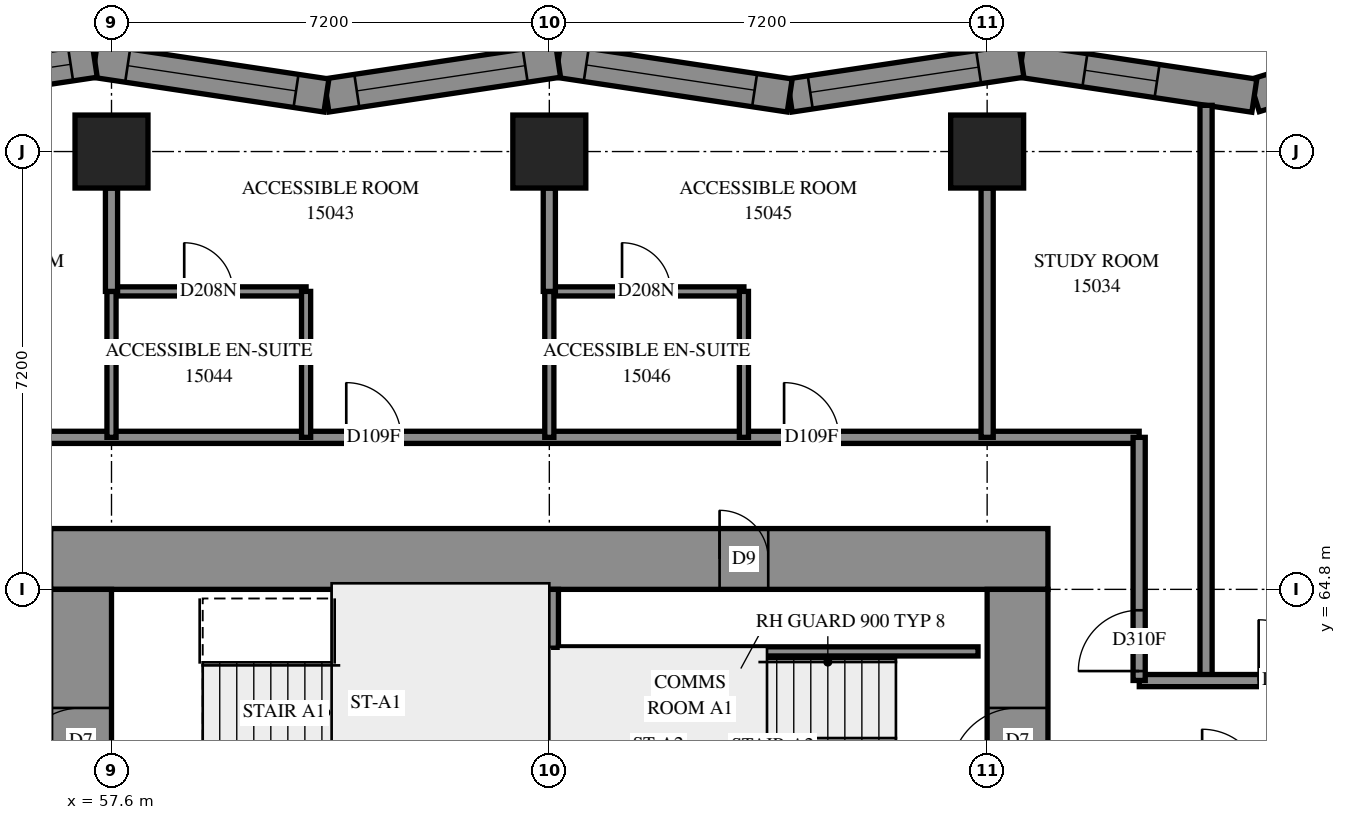
"""IFC4 building model, lengths in metres.
Left out: names, types, materials, properties, quantities, classifications, styles, units other than length and angle.
Written with IfcOpenShell. Run it as: python <this file> out.ifc"""

import sys

from ifc_helpers import new_model, si_unit, direction, frame, frame_2d, origin, origin_2d, place, context, subcontext, project, spatial, polyline, rectangle, outline, extrude, element, fill, save


model = new_model("IFC4")
c1 = context("Model", 3, precision=1e-05, world=origin(), true_north=direction((0.0, 1.0)))
c2 = subcontext(c1, "Body", "Model", "MODEL_VIEW")
j1 = project(units=[si_unit("LENGTHUNIT", "METRE"), si_unit("PLANEANGLEUNIT", "RADIAN")], contexts=[c1])
p1 = place(None, origin())
s1 = spatial("IfcSite", under=j1, at=p1, CompositionType="ELEMENT")
p2 = place(p1, origin())
s2 = spatial("IfcBuilding", under=s1, at=p2, CompositionType="ELEMENT")
p3 = place(p2, frame((0.0, 0.0, 57.6)))
s3 = spatial("IfcBuildingStorey", under=s2, at=p3, CompositionType="ELEMENT", Elevation=57.6)
for number, where, z_axis, x_axis in (
    (1, (57.6, 72.0, 0.0), (0.0, 0.0, 1.0), (1.0, 0.0, 0.0)),
    (2, (64.8, 72.0, 0.0), (0.0, 0.0, 1.0), (1.0, 0.0, 0.0)),
    (3, (72.0, 72.0, 0.0), (0.0, 0.0, 1.0), (1.0, 0.0, 0.0)),
):
    element("IfcColumn", number, at=place(p3, frame(where, z_axis=z_axis, x_axis=x_axis)), inside=s3, PredefinedType="COLUMN", context=c2, shape_type="SweptSolid", body=[
        extrude(rectangle(XDim=1.2, YDim=1.2, at=origin_2d()), origin(), (0.0, 0.0, 1.0), 3.1),
    ])
p4 = place(p3, frame((56.6, 65.3, -0.3), z_axis=(0.0, 0.0, 1.0), x_axis=(1.0, 0.0, 0.0)))
e4 = element("IfcWall", 4, at=p4, inside=s3, PredefinedType="SHEAR", context=c2, shape_type="SweptSolid", body=[
    extrude(rectangle(XDim=16.4, YDim=1.0, at=frame_2d((8.2, 0.0))), origin(), (0.0, 0.0, 1.0), 2.7),
])
p5 = place(p4, frame((11.0, 0.0, 0.3)))
e5 = element("IfcOpeningElement", 5, at=p5, cuts=e4, PredefinedType="OPENING", context=c2, shape_type="SweptSolid", body=[
    extrude(rectangle(XDim=0.8, YDim=2.1, at=frame_2d((0.4, 1.05))), frame((0.0, 0.51, 0.0), z_axis=(0.0, -1.0, 0.0), x_axis=(1.0, 0.0, 0.0)), (0.0, 0.0, 1.0), 1.02),
])
p6 = place(p3, frame((57.1, 50.4, -0.3), z_axis=(0.0, 0.0, 1.0), x_axis=(0.0, 1.0, 0.0)))
e6 = element("IfcWall", 6, at=p6, inside=s3, PredefinedType="SHEAR", context=c2, shape_type="SweptSolid", body=[
    extrude(rectangle(XDim=14.4, YDim=1.0, at=frame_2d((7.2, 0.0))), origin(), (0.0, 0.0, 1.0), 2.7),
])
p7 = place(p6, frame((4.55, 0.0, 0.3)))
e7 = element("IfcOpeningElement", 7, at=p7, cuts=e6, PredefinedType="OPENING", context=c2, shape_type="SweptSolid", body=[
    extrude(rectangle(XDim=1.1, YDim=2.1, at=frame_2d((0.55, 1.05))), frame((0.0, 0.51, 0.0), z_axis=(0.0, -1.0, 0.0), x_axis=(1.0, 0.0, 0.0)), (0.0, 0.0, 1.0), 1.02),
])
p8 = place(p6, frame((11.35, 0.0, 0.3)))
e8 = element("IfcOpeningElement", 8, at=p8, cuts=e6, PredefinedType="OPENING", context=c2, shape_type="SweptSolid", body=[
    extrude(rectangle(XDim=1.1, YDim=2.1, at=frame_2d((0.55, 1.05))), frame((0.0, 0.51, 0.0), z_axis=(0.0, -1.0, 0.0), x_axis=(1.0, 0.0, 0.0)), (0.0, 0.0, 1.0), 1.02),
])
p9 = place(p3, frame((72.5, 50.4, -0.3), z_axis=(0.0, 0.0, 1.0), x_axis=(0.0, 1.0, 0.0)))
e9 = element("IfcWall", 9, at=p9, inside=s3, PredefinedType="SHEAR", context=c2, shape_type="SweptSolid", body=[
    extrude(rectangle(XDim=14.4, YDim=1.0, at=frame_2d((7.2, 0.0))), origin(), (0.0, 0.0, 1.0), 2.7),
])
p10 = place(p9, frame((4.55, 0.0, 0.3)))
e10 = element("IfcOpeningElement", 10, at=p10, cuts=e9, PredefinedType="OPENING", context=c2, shape_type="SweptSolid", body=[
    extrude(rectangle(XDim=1.1, YDim=2.1, at=frame_2d((0.55, 1.05))), frame((0.0, 0.51, 0.0), z_axis=(0.0, -1.0, 0.0), x_axis=(1.0, 0.0, 0.0)), (0.0, 0.0, 1.0), 1.02),
])
p11 = place(p9, frame((11.35, 0.0, 0.3)))
e11 = element("IfcOpeningElement", 11, at=p11, cuts=e9, PredefinedType="OPENING", context=c2, shape_type="SweptSolid", body=[
    extrude(rectangle(XDim=1.1, YDim=2.1, at=frame_2d((0.55, 1.05))), frame((0.0, 0.51, 0.0), z_axis=(0.0, -1.0, 0.0), x_axis=(1.0, 0.0, 0.0)), (0.0, 0.0, 1.0), 1.02),
])
p12 = place(p3, frame((64.8, 60.6, 0.0), z_axis=(0.0, 0.0, 1.0), x_axis=(0.0, 1.0, 0.0)))
e12 = element("IfcWall", 12, at=p12, inside=s3, PredefinedType="SOLIDWALL", context=c2, shape_type="SweptSolid", body=[
    extrude(rectangle(XDim=4.2, YDim=0.3, at=frame_2d((2.1, 0.0))), origin(), (0.0, 0.0, 1.0), 3.1),
])
p13 = place(p3, frame((80.039, 74.04, 0.0), z_axis=(0.0, 0.0, 1.0), x_axis=(-0.9557960147, -0.2940305738, 0.0)))
e13 = element("IfcWall", 13, at=p13, inside=s3, PredefinedType="SOLIDWALL", context=c2, shape_type="SweptSolid", body=[
    extrude(outline(polyline([(-0.235, -0.275), (3.751, -0.275), (3.876, 0.275), (0.235, 0.275), (-0.235, -0.275)])), origin(), (0.0, 0.0, 1.0), 3.1),
])
p14 = place(p13, frame((1.646, 0.0, 0.5)))
e14 = element("IfcOpeningElement", 14, at=p14, cuts=e13, PredefinedType="OPENING", context=c2, shape_type="SweptSolid", body=[
    extrude(rectangle(XDim=1.2, YDim=2.45, at=frame_2d((0.6, 1.225))), frame((0.0, 0.285, 0.0), z_axis=(0.0, -1.0, 0.0), x_axis=(1.0, 0.0, 0.0)), (0.0, 0.0, 1.0), 0.57),
])
p15 = place(p3, frame((76.394, 72.919, 0.0), z_axis=(0.0, 0.0, 1.0), x_axis=(-0.9889175987, 0.1484654269, 0.0)))
e15 = element("IfcWall", 15, at=p15, inside=s3, PredefinedType="SOLIDWALL", context=c2, shape_type="SweptSolid", body=[
    extrude(outline(polyline([(0.063, -0.275), (3.915, -0.275), (3.832, 0.275), (-0.063, 0.275), (0.063, -0.275)])), origin(), (0.0, 0.0, 1.0), 3.1),
])
p16 = place(p15, frame((1.618, 0.0, 0.5)))
e16 = element("IfcOpeningElement", 16, at=p16, cuts=e15, PredefinedType="OPENING", context=c2, shape_type="SweptSolid", body=[
    extrude(rectangle(XDim=1.2, YDim=2.45, at=frame_2d((0.6, 1.225))), frame((0.0, 0.285, 0.0), z_axis=(0.0, -1.0, 0.0), x_axis=(1.0, 0.0, 0.0)), (0.0, 0.0, 1.0), 0.57),
])
p17 = place(p3, frame((72.563, 73.494, 0.0), z_axis=(0.0, 0.0, 1.0), x_axis=(-0.9889150173, -0.1484826202, 0.0)))
e17 = element("IfcWall", 17, at=p17, inside=s3, PredefinedType="SOLIDWALL", context=c2, shape_type="SweptSolid", body=[
    extrude(outline(polyline([(-0.041, -0.275), (3.811, -0.275), (3.894, 0.275), (0.041, 0.275), (-0.041, -0.275)])), origin(), (0.0, 0.0, 1.0), 3.1),
])
p18 = place(p17, frame((0.711, 0.0, 0.5)))
e18 = element("IfcOpeningElement", 18, at=p18, cuts=e17, PredefinedType="OPENING", context=c2, shape_type="SweptSolid", body=[
    extrude(rectangle(XDim=2.8, YDim=2.45, at=frame_2d((1.4, 1.225))), frame((0.0, 0.285, 0.0), z_axis=(0.0, -1.0, 0.0), x_axis=(1.0, 0.0, 0.0)), (0.0, 0.0, 1.0), 0.57),
])
p19 = place(p3, frame((68.754, 72.922, 0.0), z_axis=(0.0, 0.0, 1.0), x_axis=(-0.9889155896, 0.1484788086, 0.0)))
e19 = element("IfcWall", 19, at=p19, inside=s3, PredefinedType="SOLIDWALL", context=c2, shape_type="SweptSolid", body=[
    extrude(outline(polyline([(0.041, -0.275), (3.894, -0.275), (3.811, 0.275), (-0.041, 0.275), (0.041, -0.275)])), origin(), (0.0, 0.0, 1.0), 3.1),
])
p20 = place(p19, frame((0.584, 0.0, 0.5)))
e20 = element("IfcOpeningElement", 20, at=p20, cuts=e19, PredefinedType="OPENING", context=c2, shape_type="SweptSolid", body=[
    extrude(rectangle(XDim=2.8, YDim=2.45, at=frame_2d((1.4, 1.225))), frame((0.0, 0.285, 0.0), z_axis=(0.0, -1.0, 0.0), x_axis=(1.0, 0.0, 0.0)), (0.0, 0.0, 1.0), 0.57),
])
p21 = place(p3, frame((64.944, 73.494, 0.0), z_axis=(0.0, 0.0, 1.0), x_axis=(-0.9889150173, -0.1484826202, 0.0)))
e21 = element("IfcWall", 21, at=p21, inside=s3, PredefinedType="SOLIDWALL", context=c2, shape_type="SweptSolid", body=[
    extrude(outline(polyline([(-0.041, -0.275), (3.811, -0.275), (3.894, 0.275), (0.041, 0.275), (-0.041, -0.275)])), origin(), (0.0, 0.0, 1.0), 3.1),
])
p22 = place(p21, frame((0.547, 0.0, 0.5)))
e22 = element("IfcOpeningElement", 22, at=p22, cuts=e21, PredefinedType="OPENING", context=c2, shape_type="SweptSolid", body=[
    extrude(rectangle(XDim=2.8, YDim=2.45, at=frame_2d((1.4, 1.225))), frame((0.0, 0.285, 0.0), z_axis=(0.0, -1.0, 0.0), x_axis=(1.0, 0.0, 0.0)), (0.0, 0.0, 1.0), 0.57),
])
p23 = place(p3, frame((61.134, 72.922, 0.0), z_axis=(0.0, 0.0, 1.0), x_axis=(-0.9889155896, 0.1484788086, 0.0)))
e23 = element("IfcWall", 23, at=p23, inside=s3, PredefinedType="SOLIDWALL", context=c2, shape_type="SweptSolid", body=[
    extrude(outline(polyline([(0.041, -0.275), (3.894, -0.275), (3.811, 0.275), (-0.041, 0.275), (0.041, -0.275)])), origin(), (0.0, 0.0, 1.0), 3.1),
])
p24 = place(p23, frame((0.505, 0.0, 0.5)))
e24 = element("IfcOpeningElement", 24, at=p24, cuts=e23, PredefinedType="OPENING", context=c2, shape_type="SweptSolid", body=[
    extrude(rectangle(XDim=2.8, YDim=2.45, at=frame_2d((1.4, 1.225))), frame((0.0, 0.285, 0.0), z_axis=(0.0, -1.0, 0.0), x_axis=(1.0, 0.0, 0.0)), (0.0, 0.0, 1.0), 0.57),
])
p25 = place(p3, frame((57.325, 73.494, 0.0), z_axis=(0.0, 0.0, 1.0), x_axis=(-0.9889155896, -0.1484788086, 0.0)))
e25 = element("IfcWall", 25, at=p25, inside=s3, PredefinedType="SOLIDWALL", context=c2, shape_type="SweptSolid", body=[
    extrude(outline(polyline([(-0.041, -0.275), (3.811, -0.275), (3.894, 0.275), (0.041, 0.275), (-0.041, -0.275)])), origin(), (0.0, 0.0, 1.0), 3.1),
])
p26 = place(p25, frame((0.402, 0.0, 0.5)))
e26 = element("IfcOpeningElement", 26, at=p26, cuts=e25, PredefinedType="OPENING", context=c2, shape_type="SweptSolid", body=[
    extrude(rectangle(XDim=2.8, YDim=2.45, at=frame_2d((1.4, 1.225))), frame((0.0, 0.285, 0.0), z_axis=(0.0, -1.0, 0.0), x_axis=(1.0, 0.0, 0.0)), (0.0, 0.0, 1.0), 0.57),
])
p27 = place(p3, frame((64.95, 63.78, 0.0), z_axis=(0.0, 0.0, 1.0), x_axis=(1.0, 0.0, 0.0)))
e27 = element("IfcWall", 27, at=p27, inside=s3, PredefinedType="PARTITIONING", context=c2, shape_type="SweptSolid", body=[
    extrude(rectangle(XDim=6.9, YDim=0.15, at=frame_2d((3.45, 0.0))), origin(), (0.0, 0.0, 1.0), 3.1),
])
p28 = place(p3, frame((55.1, 67.3, 0.0), z_axis=(0.0, 0.0, 1.0), x_axis=(1.0, 0.0, 0.0)))
e28 = element("IfcWall", 28, at=p28, inside=s3, PredefinedType="PARTITIONING", context=c2, shape_type="SweptSolid", body=[
    extrude(rectangle(XDim=19.4, YDim=0.2, at=frame_2d((9.7, 0.0))), origin(), (0.0, 0.0, 1.0), 3.1),
])
p29 = place(p28, frame((6.361, 0.0, 0.0)))
e29 = element("IfcOpeningElement", 29, at=p29, cuts=e28, PredefinedType="OPENING", context=c2, shape_type="SweptSolid", body=[
    extrude(rectangle(XDim=0.9, YDim=2.1, at=frame_2d((0.45, 1.05))), frame((0.0, 0.11, 0.0), z_axis=(0.0, -1.0, 0.0), x_axis=(1.0, 0.0, 0.0)), (0.0, 0.0, 1.0), 0.22),
])
p30 = place(p28, frame((13.561, 0.0, 0.0)))
e30 = element("IfcOpeningElement", 30, at=p30, cuts=e28, PredefinedType="OPENING", context=c2, shape_type="SweptSolid", body=[
    extrude(rectangle(XDim=0.9, YDim=2.1, at=frame_2d((0.45, 1.05))), frame((0.0, 0.11, 0.0), z_axis=(0.0, -1.0, 0.0), x_axis=(1.0, 0.0, 0.0)), (0.0, 0.0, 1.0), 0.22),
])
p31 = place(p3, frame((75.6, 63.3, 0.0), z_axis=(0.0, 0.0, 1.0), x_axis=(0.0, 1.0, 0.0)))
e31 = element("IfcWall", 31, at=p31, inside=s3, PredefinedType="PARTITIONING", context=c2, shape_type="SweptSolid", body=[
    extrude(rectangle(XDim=9.46, YDim=0.2, at=frame_2d((4.73, 0.0))), origin(), (0.0, 0.0, 1.0), 3.1),
])
p32 = place(p3, frame((74.502, 63.3, 0.0), z_axis=(0.0, 0.0, 1.0), x_axis=(1.0, 0.0, 0.0)))
e32 = element("IfcWall", 32, at=p32, inside=s3, PredefinedType="PARTITIONING", context=c2, shape_type="SweptSolid", body=[
    extrude(rectangle(XDim=4.698, YDim=0.2, at=frame_2d((2.349, 0.0))), origin(), (0.0, 0.0, 1.0), 3.1),
])
p33 = place(p32, frame((1.963, 0.0, 0.0)))
e33 = element("IfcOpeningElement", 33, at=p33, cuts=e32, PredefinedType="OPENING", context=c2, shape_type="SweptSolid", body=[
    extrude(rectangle(XDim=1.0, YDim=2.1, at=frame_2d((0.5, 1.05))), frame((0.0, 0.11, 0.0), z_axis=(0.0, -1.0, 0.0), x_axis=(1.0, 0.0, 0.0)), (0.0, 0.0, 1.0), 0.22),
])
p34 = place(p3, frame((72.0, 67.3, 0.0), z_axis=(0.0, 0.0, 1.0), x_axis=(0.0, 1.0, 0.0)))
e34 = element("IfcWall", 34, at=p34, inside=s3, PredefinedType="PARTITIONING", context=c2, shape_type="SweptSolid", body=[
    extrude(rectangle(XDim=4.1, YDim=0.2, at=frame_2d((2.05, 0.0))), origin(), (0.0, 0.0, 1.0), 3.1),
])
p35 = place(p3, frame((74.5, 63.302, 0.0), z_axis=(0.0, 0.0, 1.0), x_axis=(0.0, 1.0, 0.0)))
e35 = element("IfcWall", 35, at=p35, inside=s3, PredefinedType="PARTITIONING", context=c2, shape_type="SweptSolid", body=[
    extrude(rectangle(XDim=3.998, YDim=0.2, at=frame_2d((1.999, 0.0))), origin(), (0.0, 0.0, 1.0), 3.1),
])
p36 = place(p35, frame((0.154, 0.0, 0.0)))
e36 = element("IfcOpeningElement", 36, at=p36, cuts=e35, PredefinedType="OPENING", context=c2, shape_type="SweptSolid", body=[
    extrude(rectangle(XDim=1.0, YDim=2.1, at=frame_2d((0.5, 1.05))), frame((0.0, 0.11, 0.0), z_axis=(0.0, -1.0, 0.0), x_axis=(1.0, 0.0, 0.0)), (0.0, 0.0, 1.0), 0.22),
])
p37 = place(p3, frame((64.8, 69.7, 0.0), z_axis=(0.0, 0.0, 1.0), x_axis=(1.0, 0.0, 0.0)))
e37 = element("IfcWall", 37, at=p37, inside=s3, PredefinedType="PARTITIONING", context=c2, shape_type="SweptSolid", body=[
    extrude(rectangle(XDim=3.2, YDim=0.15, at=frame_2d((1.6, 0.0))), origin(), (0.0, 0.0, 1.0), 3.1),
])
p38 = place(p37, frame((1.196, 0.0, 0.0)))
e38 = element("IfcOpeningElement", 38, at=p38, cuts=e37, PredefinedType="OPENING", context=c2, shape_type="SweptSolid", body=[
    extrude(rectangle(XDim=0.8, YDim=2.1, at=frame_2d((0.4, 1.05))), frame((0.0, 0.085, 0.0), z_axis=(0.0, -1.0, 0.0), x_axis=(1.0, 0.0, 0.0)), (0.0, 0.0, 1.0), 0.17),
])
p39 = place(p3, frame((57.6, 69.7, 0.0), z_axis=(0.0, 0.0, 1.0), x_axis=(1.0, 0.0, 0.0)))
e39 = element("IfcWall", 39, at=p39, inside=s3, PredefinedType="PARTITIONING", context=c2, shape_type="SweptSolid", body=[
    extrude(rectangle(XDim=3.2, YDim=0.15, at=frame_2d((1.6, 0.0))), origin(), (0.0, 0.0, 1.0), 3.1),
])
p40 = place(p39, frame((1.196, 0.0, 0.0)))
e40 = element("IfcOpeningElement", 40, at=p40, cuts=e39, PredefinedType="OPENING", context=c2, shape_type="SweptSolid", body=[
    extrude(rectangle(XDim=0.8, YDim=2.1, at=frame_2d((0.4, 1.05))), frame((0.0, 0.085, 0.0), z_axis=(0.0, -1.0, 0.0), x_axis=(1.0, 0.0, 0.0)), (0.0, 0.0, 1.0), 0.17),
])
for number, where, z_axis, x_axis in (
    (41, (57.6, 67.3, 0.0), (0.0, 0.0, 1.0), (0.0, 1.0, 0.0)),
    (42, (60.8, 67.3, 0.0), (0.0, 0.0, 1.0), (0.0, 1.0, 0.0)),
    (43, (68.0, 67.3, 0.0), (0.0, 0.0, 1.0), (0.0, 1.0, 0.0)),
    (44, (64.8, 67.3, 0.0), (0.0, 0.0, 1.0), (0.0, 1.0, 0.0)),
):
    element("IfcWall", number, at=place(p3, frame(where, z_axis=z_axis, x_axis=x_axis)), inside=s3, PredefinedType="PARTITIONING", context=c2, shape_type="SweptSolid", body=[
        extrude(rectangle(XDim=2.4, YDim=0.15, at=frame_2d((1.2, 0.0))), origin(), (0.0, 0.0, 1.0), 3.1),
    ])
for number, where, z_axis, x_axis in (
    (45, (57.6, 69.7, 0.0), (0.0, 0.0, 1.0), (0.0, 1.0, 0.0)),
    (46, (64.8, 69.7, 0.0), (0.0, 0.0, 1.0), (0.0, 1.0, 0.0)),
):
    element("IfcWall", number, at=place(p3, frame(where, z_axis=z_axis, x_axis=x_axis)), inside=s3, PredefinedType="PARTITIONING", context=c2, shape_type="SweptSolid", body=[
        extrude(rectangle(XDim=1.7, YDim=0.2, at=frame_2d((0.85, 0.0))), origin(), (0.0, 0.0, 1.0), 3.1),
    ])
p41 = place(p16, origin())
e47 = element("IfcWindow", 47, at=p41, inside=s3, PartitioningType="SINGLE_PANEL", PredefinedType="WINDOW", context=c2, shape_type="SweptSolid", body=[
    extrude(rectangle(XDim=1.2, YDim=2.45, at=frame_2d((0.6, 1.225))), frame((0.0, 0.155, 0.0), z_axis=(0.0, -1.0, 0.0), x_axis=(1.0, 0.0, 0.0)), (0.0, 0.0, 1.0), 0.06),
])
fill(e16, e47)
p42 = place(p18, origin())
e48 = element("IfcWindow", 48, at=p42, inside=s3, PartitioningType="SINGLE_PANEL", PredefinedType="WINDOW", context=c2, shape_type="SweptSolid", body=[
    extrude(rectangle(XDim=2.8, YDim=2.45, at=frame_2d((1.4, 1.225))), frame((0.0, 0.155, 0.0), z_axis=(0.0, -1.0, 0.0), x_axis=(1.0, 0.0, 0.0)), (0.0, 0.0, 1.0), 0.06),
])
fill(e18, e48)
p43 = place(p20, origin())
e49 = element("IfcWindow", 49, at=p43, inside=s3, PartitioningType="SINGLE_PANEL", PredefinedType="WINDOW", context=c2, shape_type="SweptSolid", body=[
    extrude(rectangle(XDim=2.8, YDim=2.45, at=frame_2d((1.4, 1.225))), frame((0.0, 0.155, 0.0), z_axis=(0.0, -1.0, 0.0), x_axis=(1.0, 0.0, 0.0)), (0.0, 0.0, 1.0), 0.06),
])
fill(e20, e49)
p44 = place(p22, origin())
e50 = element("IfcWindow", 50, at=p44, inside=s3, PartitioningType="SINGLE_PANEL", PredefinedType="WINDOW", context=c2, shape_type="SweptSolid", body=[
    extrude(rectangle(XDim=2.8, YDim=2.45, at=frame_2d((1.4, 1.225))), frame((0.0, 0.155, 0.0), z_axis=(0.0, -1.0, 0.0), x_axis=(1.0, 0.0, 0.0)), (0.0, 0.0, 1.0), 0.06),
])
fill(e22, e50)
p45 = place(p24, origin())
e51 = element("IfcWindow", 51, at=p45, inside=s3, PartitioningType="SINGLE_PANEL", PredefinedType="WINDOW", context=c2, shape_type="SweptSolid", body=[
    extrude(rectangle(XDim=2.8, YDim=2.45, at=frame_2d((1.4, 1.225))), frame((0.0, 0.155, 0.0), z_axis=(0.0, -1.0, 0.0), x_axis=(1.0, 0.0, 0.0)), (0.0, 0.0, 1.0), 0.06),
])
fill(e24, e51)
p46 = place(p26, origin())
e52 = element("IfcWindow", 52, at=p46, inside=s3, PartitioningType="SINGLE_PANEL", PredefinedType="WINDOW", context=c2, shape_type="SweptSolid", body=[
    extrude(rectangle(XDim=2.8, YDim=2.45, at=frame_2d((1.4, 1.225))), frame((0.0, 0.155, 0.0), z_axis=(0.0, -1.0, 0.0), x_axis=(1.0, 0.0, 0.0)), (0.0, 0.0, 1.0), 0.06),
])
fill(e26, e52)
p47 = place(p5, origin())
e53 = element("IfcDoor", 53, at=p47, inside=s3, OperationType="SINGLE_SWING_RIGHT", PredefinedType="DOOR", context=c2, shape_type="SweptSolid", body=[
    extrude(rectangle(XDim=0.8, YDim=2.1, at=frame_2d((0.4, 1.05))), frame((0.0, -0.44, 0.0), z_axis=(0.0, -1.0, 0.0), x_axis=(1.0, 0.0, 0.0)), (0.0, 0.0, 1.0), 0.05),
])
fill(e5, e53)
p48 = place(p8, origin())
e54 = element("IfcDoor", 54, at=p48, inside=s3, OperationType="SINGLE_SWING_LEFT", PredefinedType="DOOR", context=c2, shape_type="SweptSolid", body=[
    extrude(rectangle(XDim=1.1, YDim=2.1, at=frame_2d((0.55, 1.05))), frame((0.0, 0.025, 0.0), z_axis=(0.0, -1.0, 0.0), x_axis=(1.0, 0.0, 0.0)), (0.0, 0.0, 1.0), 0.05),
])
fill(e8, e54)
p49 = place(p11, origin())
e55 = element("IfcDoor", 55, at=p49, inside=s3, OperationType="SINGLE_SWING_RIGHT", PredefinedType="DOOR", context=c2, shape_type="SweptSolid", body=[
    extrude(rectangle(XDim=1.1, YDim=2.1, at=frame_2d((0.55, 1.05))), frame((0.0, 0.025, 0.0), z_axis=(0.0, -1.0, 0.0), x_axis=(1.0, 0.0, 0.0)), (0.0, 0.0, 1.0), 0.05),
])
fill(e11, e55)
p50 = place(p36, origin())
e56 = element("IfcDoor", 56, at=p50, inside=s3, OperationType="SINGLE_SWING_RIGHT", PredefinedType="DOOR", context=c2, shape_type="SweptSolid", body=[
    extrude(rectangle(XDim=1.0, YDim=2.1, at=frame_2d((0.5, 1.05))), frame((0.0, 0.025, 0.0), z_axis=(0.0, -1.0, 0.0), x_axis=(1.0, 0.0, 0.0)), (0.0, 0.0, 1.0), 0.05),
])
fill(e36, e56)
p51 = place(p29, origin())
e57 = element("IfcDoor", 57, at=p51, inside=s3, OperationType="SINGLE_SWING_RIGHT", PredefinedType="DOOR", context=c2, shape_type="SweptSolid", body=[
    extrude(rectangle(XDim=0.9, YDim=2.1, at=frame_2d((0.45, 1.05))), frame((0.0, 0.025, 0.0), z_axis=(0.0, -1.0, 0.0), x_axis=(1.0, 0.0, 0.0)), (0.0, 0.0, 1.0), 0.05),
])
fill(e29, e57)
p52 = place(p40, origin())
e58 = element("IfcDoor", 58, at=p52, inside=s3, OperationType="SINGLE_SWING_RIGHT", PredefinedType="DOOR", context=c2, shape_type="SweptSolid", body=[
    extrude(rectangle(XDim=0.8, YDim=2.1, at=frame_2d((0.4, 1.05))), frame((0.0, 0.025, 0.0), z_axis=(0.0, -1.0, 0.0), x_axis=(1.0, 0.0, 0.0)), (0.0, 0.0, 1.0), 0.05),
])
fill(e40, e58)
p53 = place(p30, origin())
e59 = element("IfcDoor", 59, at=p53, inside=s3, OperationType="SINGLE_SWING_RIGHT", PredefinedType="DOOR", context=c2, shape_type="SweptSolid", body=[
    extrude(rectangle(XDim=0.9, YDim=2.1, at=frame_2d((0.45, 1.05))), frame((0.0, 0.025, 0.0), z_axis=(0.0, -1.0, 0.0), x_axis=(1.0, 0.0, 0.0)), (0.0, 0.0, 1.0), 0.05),
])
fill(e30, e59)
p54 = place(p38, origin())
e60 = element("IfcDoor", 60, at=p54, inside=s3, OperationType="SINGLE_SWING_RIGHT", PredefinedType="DOOR", context=c2, shape_type="SweptSolid", body=[
    extrude(rectangle(XDim=0.8, YDim=2.1, at=frame_2d((0.4, 1.05))), frame((0.0, 0.025, 0.0), z_axis=(0.0, -1.0, 0.0), x_axis=(1.0, 0.0, 0.0)), (0.0, 0.0, 1.0), 0.05),
])
fill(e38, e60)
p55 = place(p33, origin())
e61 = element("IfcDoor", 61, at=p55, inside=s3, OperationType="SINGLE_SWING_LEFT", PredefinedType="DOOR", context=c2, shape_type="SweptSolid", body=[
    extrude(rectangle(XDim=1.0, YDim=2.1, at=frame_2d((0.5, 1.05))), frame((0.0, 0.025, 0.0), z_axis=(0.0, -1.0, 0.0), x_axis=(1.0, 0.0, 0.0)), (0.0, 0.0, 1.0), 0.05),
])
fill(e33, e61)
save(model, sys.argv[1])
